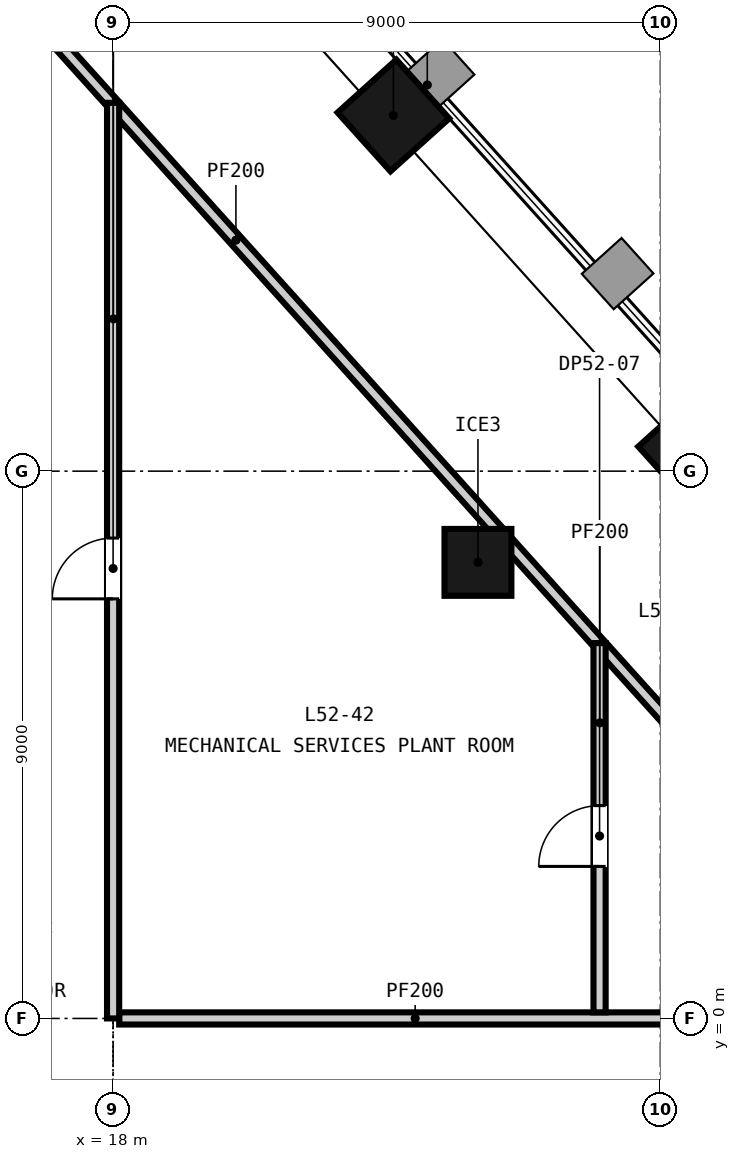
"""IFC4 building model, lengths in metres.
Left out: names, types, materials, properties, quantities, classifications, styles, units other than length and angle.
Written with IfcOpenShell. Run it as: python <this file> out.ifc"""

import sys

from ifc_helpers import new_model, si_unit, direction, frame, frame_2d, origin, origin_2d, place, context, subcontext, project, spatial, rectangle, extrude, element, fill, save


model = new_model("IFC4")
c1 = context("Model", 3, precision=1e-05, world=origin(), true_north=direction((0.0, 1.0)))
c2 = subcontext(c1, "Body", "Model", "MODEL_VIEW")
j1 = project(units=[si_unit("LENGTHUNIT", "METRE"), si_unit("PLANEANGLEUNIT", "RADIAN")], contexts=[c1])
p1 = place(None, origin())
s1 = spatial("IfcSite", under=j1, at=p1, CompositionType="ELEMENT")
p2 = place(p1, origin())
s2 = spatial("IfcBuilding", under=s1, at=p2, CompositionType="ELEMENT")
p3 = place(p2, frame((0.0, 0.0, 207.3)))
s3 = spatial("IfcBuildingStorey", under=s2, at=p3, CompositionType="ELEMENT", Elevation=207.3)
for number, where, z_axis, x_axis in (
    (1, (27.555, 9.357, -0.3), (0.0, 0.0, 1.0), (-0.669, 0.743, 0.0)),
    (2, (22.61, 14.849, -0.3), (0.0, 0.0, 1.0), (-0.669, 0.743, 0.0)),
):
    element("IfcColumn", number, at=place(p3, frame(where, z_axis=z_axis, x_axis=x_axis)), inside=s3, PredefinedType="COLUMN", context=c2, shape_type="SweptSolid", body=[
        extrude(rectangle(XDim=1.3, YDim=1.3, at=origin_2d()), origin(), (0.0, 0.0, 1.0), 4.5),
    ])
p4 = place(p3, frame((24.0, 7.5, -0.3), z_axis=(0.0, 0.0, 1.0), x_axis=(1.0, 0.0, 0.0)))
e3 = element("IfcColumn", 3, at=p4, inside=s3, PredefinedType="COLUMN", context=c2, shape_type="SweptSolid", body=[
    extrude(rectangle(XDim=1.1, YDim=1.1, at=origin_2d()), origin(), (0.0, 0.0, 1.0), 4.5),
])
p5 = place(p3, frame((18.1, 0.0, 0.0), z_axis=(0.0, 0.0, 1.0), x_axis=(1.0, 0.0, 0.0)))
e4 = element("IfcWall", 4, at=p5, inside=s3, PredefinedType="PARTITIONING", context=c2, shape_type="SweptSolid", body=[
    extrude(rectangle(XDim=9.725, YDim=0.2, at=frame_2d((4.863, 0.0))), origin(), (0.0, 0.0, 1.0), 4.2),
])
p6 = place(p3, frame((18.0, 0.0, 0.0), z_axis=(0.0, 0.0, 1.0), x_axis=(0.0, 1.0, 0.0)))
e5 = element("IfcWall", 5, at=p6, inside=s3, PredefinedType="PARTITIONING", context=c2, shape_type="SweptSolid", body=[
    extrude(rectangle(XDim=15.057, YDim=0.2, at=frame_2d((7.529, 0.0))), origin(), (0.0, 0.0, 1.0), 4.2),
])
p7 = place(p6, frame((6.9, 0.0, 0.0)))
e6 = element("IfcOpeningElement", 6, at=p7, cuts=e5, PredefinedType="OPENING", context=c2, shape_type="SweptSolid", body=[
    extrude(rectangle(XDim=1.0, YDim=2.1, at=frame_2d((0.5, 1.05))), frame((0.0, 0.11, 0.0), z_axis=(0.0, -1.0, 0.0), x_axis=(1.0, 0.0, 0.0)), (0.0, 0.0, 1.0), 0.22),
])
p8 = place(p3, frame((26.0, 0.1, 0.0), z_axis=(0.0, 0.0, 1.0), x_axis=(0.0, 1.0, 0.0)))
e7 = element("IfcWall", 7, at=p8, inside=s3, PredefinedType="PARTITIONING", context=c2, shape_type="SweptSolid", body=[
    extrude(rectangle(XDim=6.072, YDim=0.2, at=frame_2d((3.036, 0.0))), origin(), (0.0, 0.0, 1.0), 4.2),
])
p9 = place(p8, frame((2.4, 0.0, 0.0)))
e8 = element("IfcOpeningElement", 8, at=p9, cuts=e7, PredefinedType="OPENING", context=c2, shape_type="SweptSolid", body=[
    extrude(rectangle(XDim=1.0, YDim=2.1, at=frame_2d((0.5, 1.05))), frame((0.0, 0.11, 0.0), z_axis=(0.0, -1.0, 0.0), x_axis=(1.0, 0.0, 0.0)), (0.0, 0.0, 1.0), 0.22),
])
p10 = place(p3, frame((10.863, 22.964, 0.0), z_axis=(0.0, 0.0, 1.0), x_axis=(0.669131375447, -0.743144132987, 0.0)))
e9 = element("IfcWall", 9, at=p10, inside=s3, PredefinedType="PARTITIONING", context=c2, shape_type="SweptSolid", body=[
    extrude(rectangle(XDim=27.355, YDim=0.2, at=frame_2d((13.678, 0.0))), origin(), (0.0, 0.0, 1.0), 4.2),
])
p11 = place(p3, frame((29.184, 2.448, 0.0), z_axis=(0.0, 0.0, 1.0), x_axis=(-0.499996482004, -0.866027434891, 0.0)))
e10 = element("IfcWall", 10, at=p11, inside=s3, PredefinedType="PARTITIONING", context=c2, shape_type="SweptSolid", body=[
    extrude(rectangle(XDim=24.962, YDim=0.2, at=frame_2d((12.481, 0.0))), origin(), (0.0, 0.0, 1.0), 4.2),
])
p12 = place(p7, origin())
e11 = element("IfcDoor", 11, at=p12, inside=s3, OperationType="SINGLE_SWING_LEFT", PredefinedType="DOOR", context=c2, shape_type="SweptSolid", body=[
    extrude(rectangle(XDim=1.0, YDim=2.1, at=frame_2d((0.5, 1.05))), frame((0.0, 0.025, 0.0), z_axis=(0.0, -1.0, 0.0), x_axis=(1.0, 0.0, 0.0)), (0.0, 0.0, 1.0), 0.05),
])
fill(e6, e11)
p13 = place(p9, origin())
e12 = element("IfcDoor", 12, at=p13, inside=s3, OperationType="SINGLE_SWING_LEFT", PredefinedType="DOOR", context=c2, shape_type="SweptSolid", body=[
    extrude(rectangle(XDim=1.0, YDim=2.1, at=frame_2d((0.5, 1.05))), frame((0.0, 0.025, 0.0), z_axis=(0.0, -1.0, 0.0), x_axis=(1.0, 0.0, 0.0)), (0.0, 0.0, 1.0), 0.05),
])
fill(e8, e12)
save(model, sys.argv[1])
